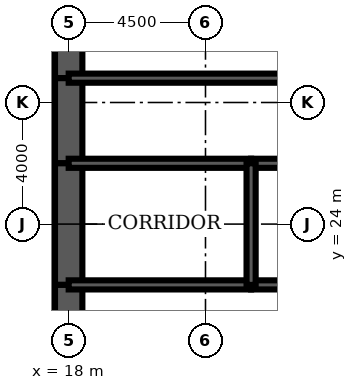
"""IFC4 building model, lengths in metres.
Left out: names, types, materials, properties, quantities, classifications, styles, units other than length and angle.
Written with IfcOpenShell. Run it as: python <this file> out.ifc"""

import sys

from ifc_helpers import new_model, si_unit, direction, frame, frame_2d, origin, place, context, subcontext, project, spatial, rectangle, extrude, element, fill, save


model = new_model("IFC4")
c1 = context("Model", 3, precision=1e-05, world=origin(), true_north=direction((0.0, 1.0)))
c2 = subcontext(c1, "Body", "Model", "MODEL_VIEW")
j1 = project(units=[si_unit("LENGTHUNIT", "METRE"), si_unit("PLANEANGLEUNIT", "RADIAN")], contexts=[c1])
p1 = place(None, origin())
s1 = spatial("IfcSite", under=j1, at=p1, CompositionType="ELEMENT")
p2 = place(p1, origin())
s2 = spatial("IfcBuilding", under=s1, at=p2, CompositionType="ELEMENT")
p3 = place(p2, frame((0.0, 0.0, 142.5)))
s3 = spatial("IfcBuildingStorey", under=s2, at=p3, CompositionType="ELEMENT", Elevation=142.5)
p4 = place(p3, frame((18.0, 32.0, 0.0), z_axis=(0.0, 0.0, 1.0), x_axis=(0.0, -1.0, 0.0)))
e1 = element("IfcWall", 1, at=p4, inside=s3, PredefinedType="SHEAR", context=c2, shape_type="SweptSolid", body=[
    extrude(rectangle(XDim=3.2, YDim=0.9, at=frame_2d((1.6, 0.0))), origin(), (0.0, 0.0, 1.0), 4.2),
])
p5 = place(p3, frame((18.0, 28.8, 0.0), z_axis=(0.0, 0.0, 1.0), x_axis=(0.0, -1.0, 0.0)))
e2 = element("IfcWall", 2, at=p5, inside=s3, PredefinedType="SHEAR", context=c2, shape_type="SweptSolid", body=[
    extrude(rectangle(XDim=2.8, YDim=0.9, at=frame_2d((1.4, 0.0))), origin(), (0.0, 0.0, 1.0), 4.2),
])
p6 = place(p5, frame((0.4, 0.0, 0.0)))
e3 = element("IfcOpeningElement", 3, at=p6, cuts=e2, PredefinedType="OPENING", context=c2, shape_type="SweptSolid", body=[
    extrude(rectangle(XDim=1.8, YDim=2.1, at=frame_2d((0.9, 1.05))), frame((0.0, 0.46, 0.0), z_axis=(0.0, -1.0, 0.0), x_axis=(1.0, 0.0, 0.0)), (0.0, 0.0, 1.0), 0.92),
])
p7 = place(p3, frame((18.0, 26.0, 0.0), z_axis=(0.0, 0.0, 1.0), x_axis=(0.0, -1.0, 0.0)))
e4 = element("IfcWall", 4, at=p7, inside=s3, PredefinedType="SHEAR", context=c2, shape_type="SweptSolid", body=[
    extrude(rectangle(XDim=4.0, YDim=0.9, at=frame_2d((2.0, 0.0))), origin(), (0.0, 0.0, 1.0), 4.2),
])
p8 = place(p3, frame((18.0, 22.0, 0.0), z_axis=(0.0, 0.0, 1.0), x_axis=(0.0, -1.0, 0.0)))
e5 = element("IfcWall", 5, at=p8, inside=s3, PredefinedType="SHEAR", context=c2, shape_type="SweptSolid", body=[
    extrude(rectangle(XDim=2.8, YDim=0.9, at=frame_2d((1.4, 0.0))), origin(), (0.0, 0.0, 1.0), 4.2),
])
p9 = place(p8, frame((0.6, 0.0, 0.0)))
e6 = element("IfcOpeningElement", 6, at=p9, cuts=e5, PredefinedType="OPENING", context=c2, shape_type="SweptSolid", body=[
    extrude(rectangle(XDim=1.8, YDim=2.1, at=frame_2d((0.9, 1.05))), frame((0.0, 0.46, 0.0), z_axis=(0.0, -1.0, 0.0), x_axis=(1.0, 0.0, 0.0)), (0.0, 0.0, 1.0), 0.92),
])
p10 = place(p3, frame((18.0, 28.8, 0.0), z_axis=(0.0, 0.0, 1.0), x_axis=(1.0, 0.0, 0.0)))
e7 = element("IfcWall", 7, at=p10, inside=s3, PredefinedType="SOLIDWALL", context=c2, shape_type="SweptSolid", body=[
    extrude(rectangle(XDim=9.0, YDim=0.3, at=frame_2d((4.5, 0.0))), origin(), (0.0, 0.0, 1.0), 4.2),
])
p11 = place(p10, frame((0.65, 0.0, 0.0)))
e8 = element("IfcOpeningElement", 8, at=p11, cuts=e7, PredefinedType="OPENING", context=c2, shape_type="SweptSolid", body=[
    extrude(rectangle(XDim=1.0, YDim=2.1, at=frame_2d((0.5, 1.05))), frame((0.0, 0.16, 0.0), z_axis=(0.0, -1.0, 0.0), x_axis=(1.0, 0.0, 0.0)), (0.0, 0.0, 1.0), 0.32),
])
p12 = place(p3, frame((18.0, 22.0, 0.0), z_axis=(0.0, 0.0, 1.0), x_axis=(1.0, 0.0, 0.0)))
e9 = element("IfcWall", 9, at=p12, inside=s3, PredefinedType="SOLIDWALL", context=c2, shape_type="SweptSolid", body=[
    extrude(rectangle(XDim=6.0, YDim=0.3, at=frame_2d((3.0, 0.0))), origin(), (0.0, 0.0, 1.0), 4.2),
])
p13 = place(p12, frame((2.0, 0.0, 0.0)))
e10 = element("IfcOpeningElement", 10, at=p13, cuts=e9, PredefinedType="OPENING", context=c2, shape_type="SweptSolid", body=[
    extrude(rectangle(XDim=1.0, YDim=2.1, at=frame_2d((0.5, 1.05))), frame((0.0, 0.16, 0.0), z_axis=(0.0, -1.0, 0.0), x_axis=(1.0, 0.0, 0.0)), (0.0, 0.0, 1.0), 0.32),
])
p14 = place(p3, frame((24.0, 22.0, 0.0), z_axis=(0.0, 0.0, 1.0), x_axis=(1.0, 0.0, 0.0)))
e11 = element("IfcWall", 11, at=p14, inside=s3, PredefinedType="SOLIDWALL", context=c2, shape_type="SweptSolid", body=[
    extrude(rectangle(XDim=3.0, YDim=0.3, at=frame_2d((1.5, 0.0))), origin(), (0.0, 0.0, 1.0), 4.2),
])
p15 = place(p14, frame((1.0, 0.0, 0.0)))
e12 = element("IfcOpeningElement", 12, at=p15, cuts=e11, PredefinedType="OPENING", context=c2, shape_type="SweptSolid", body=[
    extrude(rectangle(XDim=1.0, YDim=2.1, at=frame_2d((0.5, 1.05))), frame((0.0, 0.16, 0.0), z_axis=(0.0, -1.0, 0.0), x_axis=(1.0, 0.0, 0.0)), (0.0, 0.0, 1.0), 0.32),
])
p16 = place(p3, frame((18.0, 26.0, 0.0), z_axis=(0.0, 0.0, 1.0), x_axis=(1.0, 0.0, 0.0)))
e13 = element("IfcWall", 13, at=p16, inside=s3, PredefinedType="SOLIDWALL", context=c2, shape_type="SweptSolid", body=[
    extrude(rectangle(XDim=6.0, YDim=0.3, at=frame_2d((3.0, 0.0))), origin(), (0.0, 0.0, 1.0), 4.2),
])
p17 = place(p3, frame((24.0, 26.0, 0.0), z_axis=(0.0, 0.0, 1.0), x_axis=(1.0, 0.0, 0.0)))
e14 = element("IfcWall", 14, at=p17, inside=s3, PredefinedType="SOLIDWALL", context=c2, shape_type="SweptSolid", body=[
    extrude(rectangle(XDim=3.0, YDim=0.3, at=frame_2d((1.5, 0.0))), origin(), (0.0, 0.0, 1.0), 4.2),
])
p18 = place(p3, frame((24.0, 22.0, 0.0), z_axis=(0.0, 0.0, 1.0), x_axis=(0.0, 1.0, 0.0)))
e15 = element("IfcWall", 15, at=p18, inside=s3, PredefinedType="SOLIDWALL", context=c2, shape_type="SweptSolid", body=[
    extrude(rectangle(XDim=4.0, YDim=0.3, at=frame_2d((2.0, 0.0))), origin(), (0.0, 0.0, 1.0), 4.2),
])
p19 = place(p3, frame((22.2, 26.15, 0.0), z_axis=(0.0, 0.0, 1.0), x_axis=(0.0, 1.0, 0.0)))
e16 = element("IfcWall", 16, at=p19, inside=s3, PredefinedType="PARTITIONING", context=c2, shape_type="SweptSolid", body=[
    extrude(rectangle(XDim=2.5, YDim=0.15, at=frame_2d((1.25, 0.0))), origin(), (0.0, 0.0, 1.0), 3.0),
])
p20 = place(p19, frame((0.35, 0.0, 0.0)))
e17 = element("IfcOpeningElement", 17, at=p20, cuts=e16, PredefinedType="OPENING", context=c2, shape_type="SweptSolid", body=[
    extrude(rectangle(XDim=1.0, YDim=2.1, at=frame_2d((0.5, 1.05))), frame((0.0, 0.085, 0.0), z_axis=(0.0, -1.0, 0.0), x_axis=(1.0, 0.0, 0.0)), (0.0, 0.0, 1.0), 0.17),
])
p21 = place(p20, origin())
e18 = element("IfcDoor", 18, at=p21, inside=s3, OperationType="SINGLE_SWING_LEFT", PredefinedType="DOOR", context=c2, shape_type="SweptSolid", body=[
    extrude(rectangle(XDim=1.0, YDim=2.1, at=frame_2d((0.5, 1.05))), frame((0.0, 0.025, 0.0), z_axis=(0.0, -1.0, 0.0), x_axis=(1.0, 0.0, 0.0)), (0.0, 0.0, 1.0), 0.05),
])
fill(e17, e18)
p22 = place(p11, origin())
e19 = element("IfcDoor", 19, at=p22, inside=s3, OperationType="SINGLE_SWING_LEFT", PredefinedType="DOOR", context=c2, shape_type="SweptSolid", body=[
    extrude(rectangle(XDim=1.0, YDim=2.1, at=frame_2d((0.5, 1.05))), frame((0.0, 0.025, 0.0), z_axis=(0.0, -1.0, 0.0), x_axis=(1.0, 0.0, 0.0)), (0.0, 0.0, 1.0), 0.05),
])
fill(e8, e19)
p23 = place(p9, origin())
e20 = element("IfcDoor", 20, at=p23, inside=s3, OperationType="SINGLE_SWING_LEFT", PredefinedType="DOOR", context=c2, shape_type="SweptSolid", body=[
    extrude(rectangle(XDim=1.8, YDim=2.1, at=frame_2d((0.9, 1.05))), frame((0.0, 0.45, 0.0), z_axis=(0.0, -1.0, 0.0), x_axis=(1.0, 0.0, 0.0)), (0.0, 0.0, 1.0), 0.899),
])
fill(e6, e20)
p24 = place(p6, origin())
e21 = element("IfcDoor", 21, at=p24, inside=s3, OperationType="SINGLE_SWING_LEFT", PredefinedType="DOOR", context=c2, shape_type="SweptSolid", body=[
    extrude(rectangle(XDim=1.8, YDim=2.1, at=frame_2d((0.9, 1.05))), frame((0.0, 0.45, 0.0), z_axis=(0.0, -1.0, 0.0), x_axis=(1.0, 0.0, 0.0)), (0.0, 0.0, 1.0), 0.899),
])
fill(e3, e21)
p25 = place(p13, origin())
e22 = element("IfcDoor", 22, at=p25, inside=s3, OperationType="SINGLE_SWING_LEFT", PredefinedType="DOOR", context=c2, shape_type="SweptSolid", body=[
    extrude(rectangle(XDim=1.0, YDim=2.1, at=frame_2d((0.5, 1.05))), frame((0.0, 0.025, 0.0), z_axis=(0.0, -1.0, 0.0), x_axis=(1.0, 0.0, 0.0)), (0.0, 0.0, 1.0), 0.05),
])
fill(e10, e22)
save(model, sys.argv[1])
